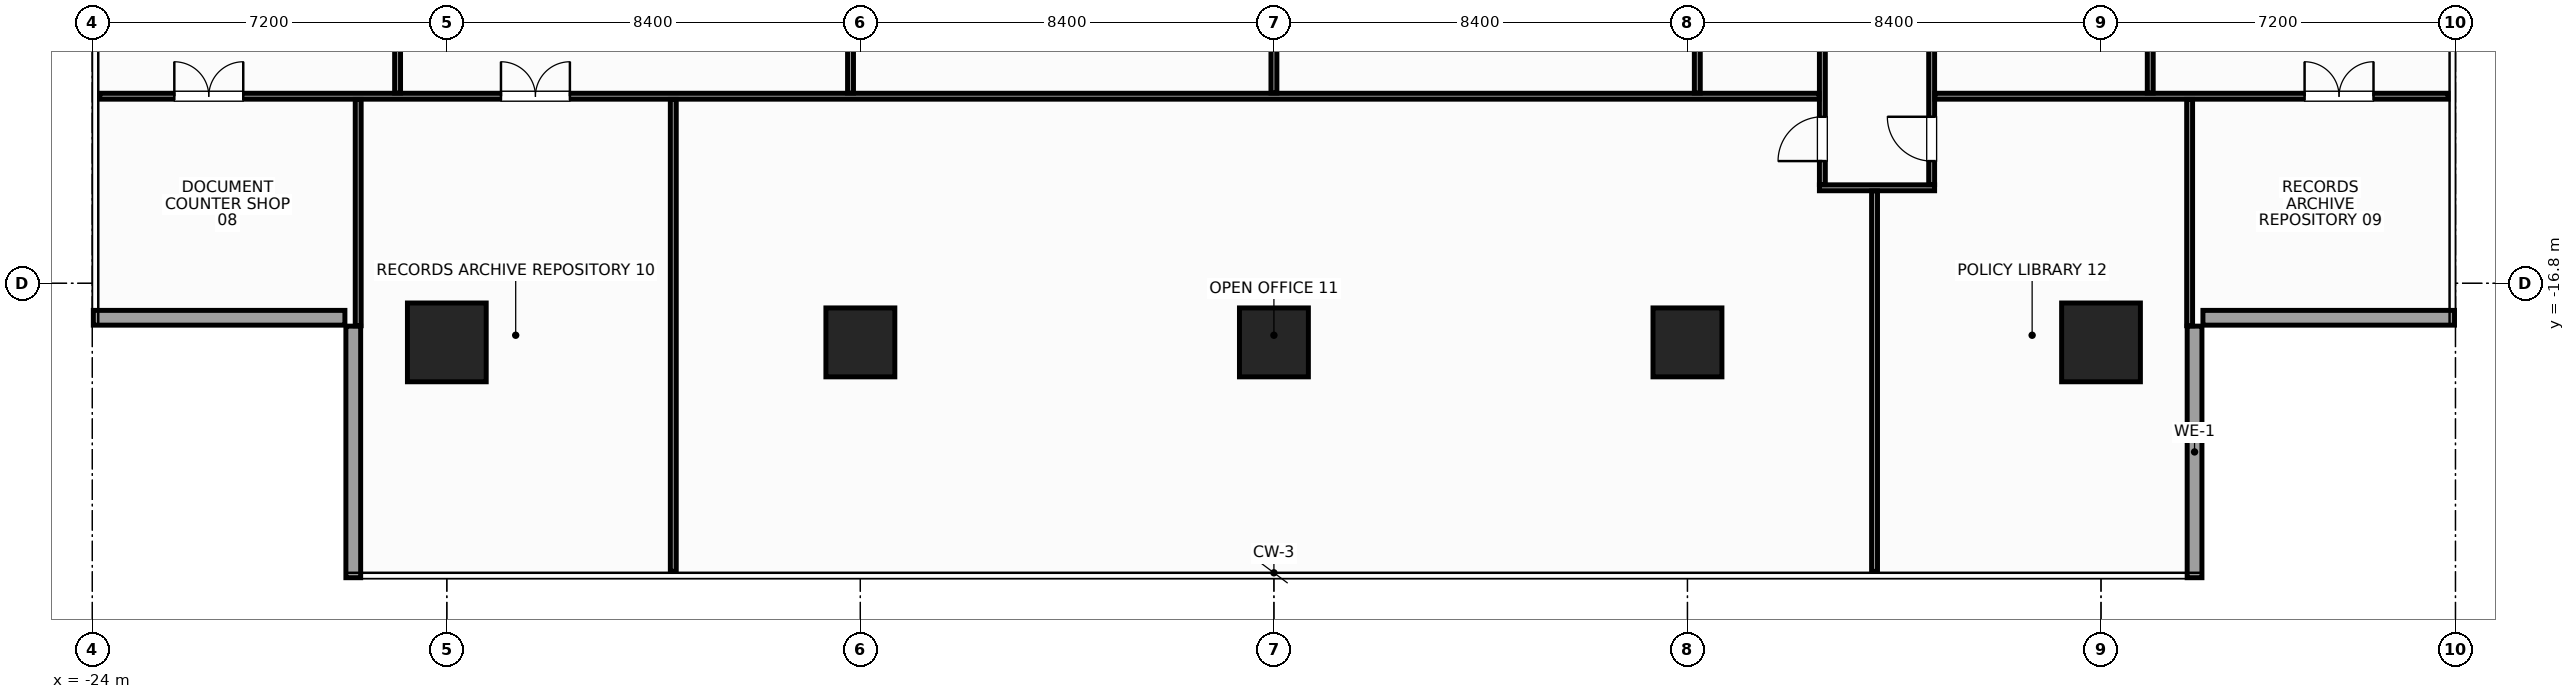
"""IFC4 building model, lengths in metres.
Left out: names, types, materials, properties, quantities, classifications, styles, units other than length and angle.
Written with IfcOpenShell. Run it as: python <this file> out.ifc"""

import sys

from ifc_helpers import new_model, si_unit, direction, frame, frame_2d, origin, origin_2d, place, context, subcontext, project, spatial, rectangle, extrude, source, transform, mapped, element, fill, save


model = new_model("IFC4")
c1 = context("Model", 3, precision=1e-05, world=origin(), true_north=direction((0.0, 1.0)))
c2 = subcontext(c1, "Body", "Model", "MODEL_VIEW")
j1 = project(units=[si_unit("LENGTHUNIT", "METRE"), si_unit("PLANEANGLEUNIT", "RADIAN")], contexts=[c1])
p1 = place(None, origin())
s1 = spatial("IfcSite", under=j1, at=p1, CompositionType="ELEMENT")
p2 = place(p1, origin())
s2 = spatial("IfcBuilding", under=s1, at=p2, CompositionType="ELEMENT")
p3 = place(p2, frame((0.0, 0.0, 178.4)))
s3 = spatial("IfcBuildingStorey", under=s2, at=p3, CompositionType="ELEMENT", Elevation=178.4)
m1 = source(origin(), c2, "Body", "SweptSolid", [
    extrude(rectangle(XDim=1.6, YDim=1.6, at=origin_2d()), origin(), (0.0, 0.0, 1.0), 3.6),
])
for number, where, z_axis, x_axis in (
    (1, (-16.8, -18.0, 0.0), (0.0, 0.0, 1.0), (1.0, 0.0, 0.0)),
    (2, (16.8, -18.0, 0.0), (0.0, 0.0, 1.0), (1.0, 0.0, 0.0)),
):
    element("IfcColumn", number, at=place(p3, frame(where, z_axis=z_axis, x_axis=x_axis)), inside=s3, PredefinedType="COLUMN", context=c2, shape_type="MappedRepresentation", body=[
        mapped(m1, transform((0.0, 0.0, 0.0), x_axis=(1.0, 0.0, 0.0), y_axis=(0.0, 1.0, 0.0), z_axis=(0.0, 0.0, 1.0), scale=1.0)),
    ])
m2 = source(origin(), c2, "Body", "SweptSolid", [
    extrude(rectangle(XDim=1.4, YDim=1.4, at=origin_2d()), origin(), (0.0, 0.0, 1.0), 3.6),
])
for number, where, z_axis, x_axis in (
    (3, (-8.4, -18.0, 0.0), (0.0, 0.0, 1.0), (1.0, 0.0, 0.0)),
    (4, (8.4, -18.0, 0.0), (0.0, 0.0, 1.0), (1.0, 0.0, 0.0)),
    (5, (0.0, -18.0, 0.0), (0.0, 0.0, 1.0), (1.0, 0.0, 0.0)),
):
    element("IfcColumn", number, at=place(p3, frame(where, z_axis=z_axis, x_axis=x_axis)), inside=s3, PredefinedType="COLUMN", context=c2, shape_type="MappedRepresentation", body=[
        mapped(m2, transform((0.0, 0.0, 0.0), x_axis=(1.0, 0.0, 0.0), y_axis=(0.0, 1.0, 0.0), z_axis=(0.0, 0.0, 1.0), scale=1.0)),
    ])
m3 = source(origin(), c2, "Body", "SweptSolid", [
    extrude(rectangle(XDim=5.11, YDim=0.3, at=frame_2d((2.555, 0.0))), origin(), (0.0, 0.0, 1.0), 2.76),
])
p4 = place(p3, frame((18.7, -22.78, 0.0), z_axis=(0.0, 0.0, 1.0), x_axis=(0.0, 1.0, 0.0)))
e6 = element("IfcWall", 6, at=p4, inside=s3, PredefinedType="STANDARD", context=c2, shape_type="MappedRepresentation", body=[
    mapped(m3, transform((0.0, 0.0, 0.0), x_axis=(1.0, 0.0, 0.0), y_axis=(0.0, 1.0, 0.0), z_axis=(0.0, 0.0, 1.0), scale=1.0)),
])
m4 = source(origin(), c2, "Body", "SweptSolid", [
    extrude(rectangle(XDim=5.11, YDim=0.3, at=frame_2d((2.555, 0.0))), origin(), (0.0, 0.0, 1.0), 2.76),
])
for number, where, z_axis, x_axis in (
    (7, (18.87, -17.5, 0.0), (0.0, 0.0, 1.0), (1.0, 0.0, 0.0)),
    (8, (-23.98, -17.5, 0.0), (0.0, 0.0, 1.0), (1.0, 0.0, 0.0)),
):
    element("IfcWall", number, at=place(p3, frame(where, z_axis=z_axis, x_axis=x_axis)), inside=s3, PredefinedType="STANDARD", context=c2, shape_type="MappedRepresentation", body=[
        mapped(m4, transform((0.0, 0.0, 0.0), x_axis=(1.0, 0.0, 0.0), y_axis=(0.0, 1.0, 0.0), z_axis=(0.0, 0.0, 1.0), scale=1.0)),
    ])
p5 = place(p3, frame((-18.7, -17.67, 0.0), z_axis=(0.0, 0.0, 1.0), x_axis=(0.0, -1.0, 0.0)))
e9 = element("IfcWall", 9, at=p5, inside=s3, PredefinedType="STANDARD", context=c2, shape_type="MappedRepresentation", body=[
    mapped(m3, transform((0.0, 0.0, 0.0), x_axis=(1.0, 0.0, 0.0), y_axis=(0.0, 1.0, 0.0), z_axis=(0.0, 0.0, 1.0), scale=1.0)),
])
m5 = source(origin(), c2, "Body", "SweptSolid", [
    extrude(rectangle(XDim=2.34, YDim=0.12, at=frame_2d((1.17, 0.0))), origin(), (0.0, 0.0, 1.0), 3.38),
])
p6 = place(p3, frame((11.08, -14.86, 0.0), z_axis=(0.0, 0.0, 1.0), x_axis=(1.0, 0.0, 0.0)))
e10 = element("IfcWall", 10, at=p6, inside=s3, PredefinedType="PARTITIONING", context=c2, shape_type="MappedRepresentation", body=[
    mapped(m5, transform((0.0, 0.0, 0.0), x_axis=(1.0, 0.0, 0.0), y_axis=(0.0, 1.0, 0.0), z_axis=(0.0, 0.0, 1.0), scale=1.0)),
])
m6 = source(origin(), c2, "Body", "SweptSolid", [
    extrude(rectangle(XDim=22.595, YDim=0.12, at=frame_2d((11.297, 0.0))), origin(), (0.0, 0.0, 1.0), 2.665),
])
p7 = place(p3, frame((11.14, -14.795, 0.0), z_axis=(0.0, 0.0, 1.0), x_axis=(0.0, 1.0, 0.0)))
e11 = element("IfcWall", 11, at=p7, inside=s3, PredefinedType="PARTITIONING", context=c2, shape_type="MappedRepresentation", body=[
    mapped(m6, transform((0.0, 0.0, 0.0), x_axis=(1.0, 0.0, 0.0), y_axis=(0.0, 1.0, 0.0), z_axis=(0.0, 0.0, 1.0), scale=1.0)),
])
p8 = place(p7, frame((0.478, 0.0, 0.0)))
e12 = element("IfcOpeningElement", 12, at=p8, cuts=e11, PredefinedType="OPENING", context=c2, shape_type="SweptSolid", body=[
    extrude(rectangle(XDim=0.9, YDim=2.15, at=frame_2d((0.45, 1.075))), frame((0.0, 0.072, 0.0), z_axis=(0.0, -1.0, 0.0), x_axis=(1.0, 0.0, 0.0)), (0.0, 0.0, 1.0), 0.144),
])
p9 = place(p3, frame((13.36, -14.795, 0.0), z_axis=(0.0, 0.0, 1.0), x_axis=(0.0, 1.0, 0.0)))
e13 = element("IfcWall", 13, at=p9, inside=s3, PredefinedType="PARTITIONING", context=c2, shape_type="MappedRepresentation", body=[
    mapped(m6, transform((0.0, 0.0, 0.0), x_axis=(1.0, 0.0, 0.0), y_axis=(0.0, 1.0, 0.0), z_axis=(0.0, 0.0, 1.0), scale=1.0)),
])
p10 = place(p9, frame((0.478, 0.0, 0.0)))
e14 = element("IfcOpeningElement", 14, at=p10, cuts=e13, PredefinedType="OPENING", context=c2, shape_type="SweptSolid", body=[
    extrude(rectangle(XDim=0.9, YDim=2.15, at=frame_2d((0.45, 1.075))), frame((0.0, 0.072, 0.0), z_axis=(0.0, -1.0, 0.0), x_axis=(1.0, 0.0, 0.0)), (0.0, 0.0, 1.0), 0.144),
])
m7 = source(origin(), c2, "Body", "SweptSolid", [
    extrude(rectangle(XDim=34.925, YDim=0.12, at=frame_2d((17.462, 0.0))), origin(), (0.0, 0.0, 1.0), 2.965),
])
p11 = place(p3, frame((-23.85, -13.0, 0.0), z_axis=(0.0, 0.0, 1.0), x_axis=(1.0, 0.0, 0.0)))
e15 = element("IfcWall", 15, at=p11, inside=s3, PredefinedType="PARTITIONING", context=c2, shape_type="MappedRepresentation", body=[
    mapped(m7, transform((0.0, 0.0, 0.0), x_axis=(1.0, 0.0, 0.0), y_axis=(0.0, 1.0, 0.0), z_axis=(0.0, 0.0, 1.0), scale=1.0)),
])
p12 = place(p11, frame((1.515, 0.0, 0.0)))
e16 = element("IfcOpeningElement", 16, at=p12, cuts=e15, PredefinedType="OPENING", context=c2, shape_type="SweptSolid", body=[
    extrude(rectangle(XDim=1.4, YDim=2.2, at=frame_2d((0.7, 1.1))), frame((0.0, 0.072, 0.0), z_axis=(0.0, -1.0, 0.0), x_axis=(1.0, 0.0, 0.0)), (0.0, 0.0, 1.0), 0.144),
])
p13 = place(p11, frame((8.15, 0.0, 0.0)))
e17 = element("IfcOpeningElement", 17, at=p13, cuts=e15, PredefinedType="OPENING", context=c2, shape_type="SweptSolid", body=[
    extrude(rectangle(XDim=1.4, YDim=2.2, at=frame_2d((0.7, 1.1))), frame((0.0, 0.072, 0.0), z_axis=(0.0, -1.0, 0.0), x_axis=(1.0, 0.0, 0.0)), (0.0, 0.0, 1.0), 0.144),
])
m8 = source(origin(), c2, "Body", "SweptSolid", [
    extrude(rectangle(XDim=10.425, YDim=0.12, at=frame_2d((5.212, 0.0))), origin(), (0.0, 0.0, 1.0), 2.965),
])
p14 = place(p3, frame((13.425, -13.0, 0.0), z_axis=(0.0, 0.0, 1.0), x_axis=(1.0, 0.0, 0.0)))
e18 = element("IfcWall", 18, at=p14, inside=s3, PredefinedType="PARTITIONING", context=c2, shape_type="MappedRepresentation", body=[
    mapped(m8, transform((0.0, 0.0, 0.0), x_axis=(1.0, 0.0, 0.0), y_axis=(0.0, 1.0, 0.0), z_axis=(0.0, 0.0, 1.0), scale=1.0)),
])
p15 = place(p14, frame((7.51, 0.0, 0.0)))
e19 = element("IfcOpeningElement", 19, at=p15, cuts=e18, PredefinedType="OPENING", context=c2, shape_type="SweptSolid", body=[
    extrude(rectangle(XDim=1.4, YDim=2.2, at=frame_2d((0.7, 1.1))), frame((0.0, 0.072, 0.0), z_axis=(0.0, -1.0, 0.0), x_axis=(1.0, 0.0, 0.0)), (0.0, 0.0, 1.0), 0.144),
])
m9 = source(origin(), c2, "Body", "SweptSolid", [
    extrude(rectangle(XDim=20.61, YDim=0.12, at=frame_2d((10.305, 0.0))), origin(), (0.0, 0.0, 1.0), 2.915),
])
p16 = place(p3, frame((-17.8, -12.935, 0.0), z_axis=(0.0, 0.0, 1.0), x_axis=(0.0, 1.0, 0.0)))
e20 = element("IfcWall", 20, at=p16, inside=s3, PredefinedType="PARTITIONING", context=c2, shape_type="MappedRepresentation", body=[
    mapped(m9, transform((0.0, 0.0, 0.0), x_axis=(1.0, 0.0, 0.0), y_axis=(0.0, 1.0, 0.0), z_axis=(0.0, 0.0, 1.0), scale=1.0)),
])
m10 = source(origin(), c2, "Body", "SweptSolid", [
    extrude(rectangle(XDim=1.625, YDim=0.12, at=frame_2d((0.812, 0.0))), origin(), (0.0, 0.0, 1.0), 2.965),
])
for number, where, z_axis, x_axis in (
    (21, (-8.6, -12.935, 0.0), (0.0, 0.0, 1.0), (0.0, 1.0, 0.0)),
    (22, (0.0, -12.935, 0.0), (0.0, 0.0, 1.0), (0.0, 1.0, 0.0)),
    (23, (8.6, -12.935, 0.0), (0.0, 0.0, 1.0), (0.0, 1.0, 0.0)),
):
    element("IfcWall", number, at=place(p3, frame(where, z_axis=z_axis, x_axis=x_axis)), inside=s3, PredefinedType="PARTITIONING", context=c2, shape_type="MappedRepresentation", body=[
        mapped(m10, transform((0.0, 0.0, 0.0), x_axis=(1.0, 0.0, 0.0), y_axis=(0.0, 1.0, 0.0), z_axis=(0.0, 0.0, 1.0), scale=1.0)),
    ])
p17 = place(p3, frame((17.8, -12.935, 0.0), z_axis=(0.0, 0.0, 1.0), x_axis=(0.0, 1.0, 0.0)))
e24 = element("IfcWall", 24, at=p17, inside=s3, PredefinedType="PARTITIONING", context=c2, shape_type="MappedRepresentation", body=[
    mapped(m9, transform((0.0, 0.0, 0.0), x_axis=(1.0, 0.0, 0.0), y_axis=(0.0, 1.0, 0.0), z_axis=(0.0, 0.0, 1.0), scale=1.0)),
])
m11 = source(origin(), c2, "Body", "SweptSolid", [
    extrude(rectangle(XDim=4.597, YDim=0.12, at=frame_2d((2.299, 0.0))), origin(), (0.0, 0.0, 1.0), 3.38),
])
p18 = place(p3, frame((-18.6, -17.662, 0.0), z_axis=(0.0, 0.0, 1.0), x_axis=(0.0, 1.0, 0.0)))
e25 = element("IfcWall", 25, at=p18, inside=s3, PredefinedType="PARTITIONING", context=c2, shape_type="MappedRepresentation", body=[
    mapped(m11, transform((0.0, 0.0, 0.0), x_axis=(1.0, 0.0, 0.0), y_axis=(0.0, 1.0, 0.0), z_axis=(0.0, 0.0, 1.0), scale=1.0)),
])
m12 = source(origin(), c2, "Body", "SweptSolid", [
    extrude(rectangle(XDim=9.585, YDim=0.12, at=frame_2d((4.792, 0.0))), origin(), (0.0, 0.0, 1.0), 2.915),
])
p19 = place(p3, frame((-12.2, -22.65, 0.0), z_axis=(0.0, 0.0, 1.0), x_axis=(0.0, 1.0, 0.0)))
e26 = element("IfcWall", 26, at=p19, inside=s3, PredefinedType="PARTITIONING", context=c2, shape_type="MappedRepresentation", body=[
    mapped(m12, transform((0.0, 0.0, 0.0), x_axis=(1.0, 0.0, 0.0), y_axis=(0.0, 1.0, 0.0), z_axis=(0.0, 0.0, 1.0), scale=1.0)),
])
m13 = source(origin(), c2, "Body", "SweptSolid", [
    extrude(rectangle(XDim=7.725, YDim=0.12, at=frame_2d((3.862, 0.0))), origin(), (0.0, 0.0, 1.0), 2.915),
])
p20 = place(p3, frame((12.2, -22.65, 0.0), z_axis=(0.0, 0.0, 1.0), x_axis=(0.0, 1.0, 0.0)))
e27 = element("IfcWall", 27, at=p20, inside=s3, PredefinedType="PARTITIONING", context=c2, shape_type="MappedRepresentation", body=[
    mapped(m13, transform((0.0, 0.0, 0.0), x_axis=(1.0, 0.0, 0.0), y_axis=(0.0, 1.0, 0.0), z_axis=(0.0, 0.0, 1.0), scale=1.0)),
])
p21 = place(p3, frame((18.6, -17.662, 0.0), z_axis=(0.0, 0.0, 1.0), x_axis=(0.0, 1.0, 0.0)))
e28 = element("IfcWall", 28, at=p21, inside=s3, PredefinedType="PARTITIONING", context=c2, shape_type="MappedRepresentation", body=[
    mapped(m11, transform((0.0, 0.0, 0.0), x_axis=(1.0, 0.0, 0.0), y_axis=(0.0, 1.0, 0.0), z_axis=(0.0, 0.0, 1.0), scale=1.0)),
])
m14 = source(origin(), c2, "Body", "SweptSolid", [
    extrude(rectangle(XDim=0.9, YDim=2.15, at=frame_2d((0.45, 1.075))), frame((0.0, 0.025, 0.0), z_axis=(0.0, -1.0, 0.0), x_axis=(1.0, 0.0, 0.0)), (0.0, 0.0, 1.0), 0.05),
])
p22 = place(p8, origin())
e29 = element("IfcDoor", 29, at=p22, inside=s3, OperationType="SINGLE_SWING_LEFT", PredefinedType="DOOR", context=c2, shape_type="MappedRepresentation", body=[
    mapped(m14, transform((0.0, 0.0, 0.0), x_axis=(1.0, 0.0, 0.0), y_axis=(0.0, 1.0, 0.0), z_axis=(0.0, 0.0, 1.0), scale=1.0)),
])
fill(e12, e29)
p23 = place(p10, origin())
e30 = element("IfcDoor", 30, at=p23, inside=s3, OperationType="SINGLE_SWING_RIGHT", PredefinedType="DOOR", context=c2, shape_type="MappedRepresentation", body=[
    mapped(m14, transform((0.0, 0.0, 0.0), x_axis=(1.0, 0.0, 0.0), y_axis=(0.0, 1.0, 0.0), z_axis=(0.0, 0.0, 1.0), scale=1.0)),
])
fill(e14, e30)
m15 = source(origin(), c2, "Body", "SweptSolid", [
    extrude(rectangle(XDim=1.4, YDim=2.2, at=frame_2d((0.7, 1.1))), frame((0.0, 0.025, 0.0), z_axis=(0.0, -1.0, 0.0), x_axis=(1.0, 0.0, 0.0)), (0.0, 0.0, 1.0), 0.05),
])
p24 = place(p12, origin())
e31 = element("IfcDoor", 31, at=p24, inside=s3, OperationType="DOUBLE_DOOR_SINGLE_SWING", PredefinedType="DOOR", context=c2, shape_type="MappedRepresentation", body=[
    mapped(m15, transform((0.0, 0.0, 0.0), x_axis=(1.0, 0.0, 0.0), y_axis=(0.0, 1.0, 0.0), z_axis=(0.0, 0.0, 1.0), scale=1.0)),
])
fill(e16, e31)
p25 = place(p15, origin())
e32 = element("IfcDoor", 32, at=p25, inside=s3, OperationType="DOUBLE_DOOR_SINGLE_SWING", PredefinedType="DOOR", context=c2, shape_type="MappedRepresentation", body=[
    mapped(m15, transform((0.0, 0.0, 0.0), x_axis=(1.0, 0.0, 0.0), y_axis=(0.0, 1.0, 0.0), z_axis=(0.0, 0.0, 1.0), scale=1.0)),
])
fill(e19, e32)
p26 = place(p13, origin())
e33 = element("IfcDoor", 33, at=p26, inside=s3, OperationType="DOUBLE_DOOR_SINGLE_SWING", PredefinedType="DOOR", context=c2, shape_type="MappedRepresentation", body=[
    mapped(m15, transform((0.0, 0.0, 0.0), x_axis=(1.0, 0.0, 0.0), y_axis=(0.0, 1.0, 0.0), z_axis=(0.0, 0.0, 1.0), scale=1.0)),
])
fill(e17, e33)
save(model, sys.argv[1])
